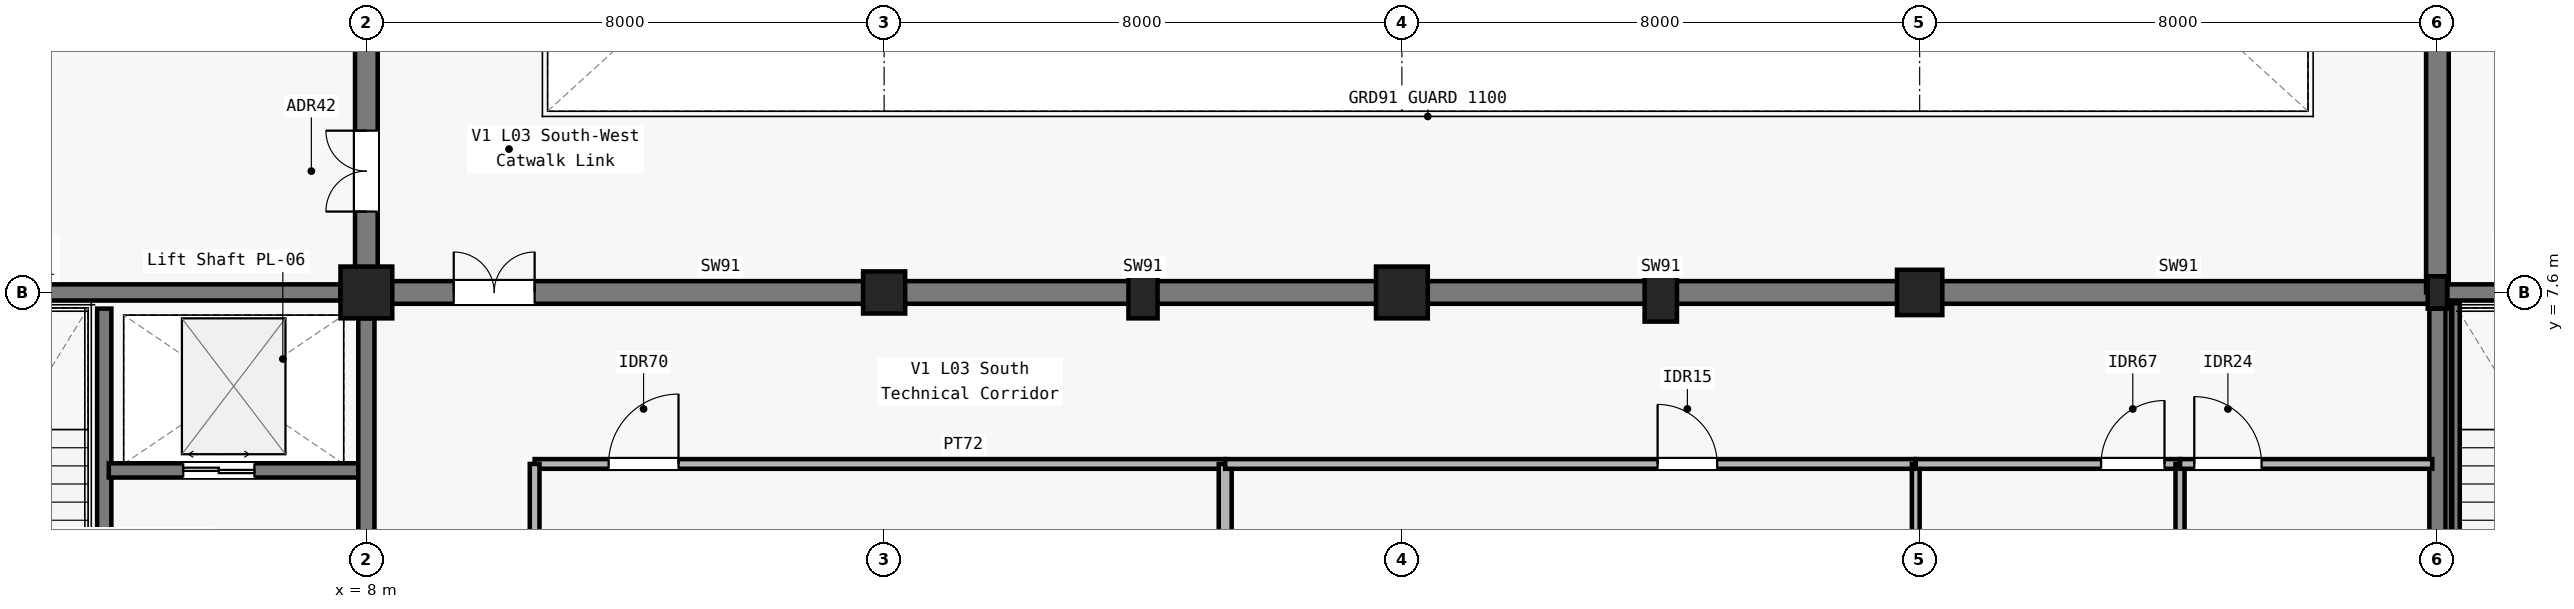
"""IFC4 building model, lengths in metres.
Left out: names, types, materials, properties, quantities, classifications, styles, units other than length and angle.
Written with IfcOpenShell. Run it as: python <this file> out.ifc"""

import sys

from ifc_helpers import new_model, si_unit, direction, frame, frame_2d, origin, origin_2d, place, context, subcontext, project, spatial, rectangle, circle, i_section, extrude, element, fill, save


model = new_model("IFC4")
c1 = context("Model", 3, precision=1e-05, world=origin(), true_north=direction((0.0, 1.0)))
c2 = subcontext(c1, "Body", "Model", "MODEL_VIEW")
j1 = project(units=[si_unit("LENGTHUNIT", "METRE"), si_unit("PLANEANGLEUNIT", "RADIAN")], contexts=[c1])
p1 = place(None, origin())
s1 = spatial("IfcSite", under=j1, at=p1, CompositionType="ELEMENT")
p2 = place(p1, origin())
s2 = spatial("IfcBuilding", under=s1, at=p2, CompositionType="ELEMENT")
p3 = place(p2, frame((0.0, 0.0, 15.0)))
s3 = spatial("IfcBuildingStorey", under=s2, at=p3, CompositionType="ELEMENT", Elevation=15.0)
p4 = place(p3, frame((8.0, 7.6, 0.0), z_axis=(0.0, 0.0, 1.0), x_axis=(1.0, 0.0, 0.0)))
e1 = element("IfcColumn", 1, at=p4, inside=s3, PredefinedType="COLUMN", context=c2, shape_type="SweptSolid", body=[
    extrude(circle(Radius=0.4, at=origin_2d()), origin(), (0.0, 0.0, 1.0), 4.8),
])
p5 = place(p3, frame((16.0, 7.6, 0.0), z_axis=(0.0, 0.0, 1.0), x_axis=(1.0, 0.0, 0.0)))
e2 = element("IfcColumn", 2, at=p5, inside=s3, PredefinedType="COLUMN", context=c2, shape_type="SweptSolid", body=[
    extrude(circle(Radius=0.325, at=origin_2d()), origin(), (0.0, 0.0, 1.0), 4.8),
])
p6 = place(p3, frame((24.0, 7.6, 0.0), z_axis=(0.0, 0.0, 1.0), x_axis=(1.0, 0.0, 0.0)))
e3 = element("IfcColumn", 3, at=p6, inside=s3, PredefinedType="COLUMN", context=c2, shape_type="SweptSolid", body=[
    extrude(rectangle(XDim=0.8, YDim=0.8, at=origin_2d()), origin(), (0.0, 0.0, 1.0), 4.8),
])
p7 = place(p3, frame((32.0, 7.6, 0.0), z_axis=(0.0, 0.0, 1.0), x_axis=(1.0, 0.0, 0.0)))
e4 = element("IfcColumn", 4, at=p7, inside=s3, PredefinedType="COLUMN", context=c2, shape_type="SweptSolid", body=[
    extrude(rectangle(XDim=0.7, YDim=0.7, at=origin_2d()), origin(), (0.0, 0.0, 1.0), 4.8),
])
p8 = place(p3, frame((40.0, 7.6, 0.0), z_axis=(0.0, 0.0, 1.0), x_axis=(1.0, 0.0, 0.0)))
e5 = element("IfcColumn", 5, at=p8, inside=s3, PredefinedType="COLUMN", context=c2, shape_type="SweptSolid", body=[
    extrude(i_section(OverallWidth=0.3, OverallDepth=0.5, WebThickness=0.014, FlangeThickness=0.028, FilletRadius=0.027, at=origin_2d()), origin(), (0.0, 0.0, 1.0), 4.8),
])
p9 = place(p3, frame((20.0, 7.6, 0.0), z_axis=(0.0, 0.0, 1.0), x_axis=(1.0, 0.0, 0.0)))
e6 = element("IfcColumn", 6, at=p9, inside=s3, PredefinedType="PILASTER", context=c2, shape_type="SweptSolid", body=[
    extrude(rectangle(XDim=0.45, YDim=0.8, at=origin_2d()), origin(), (0.0, 0.0, 1.0), 4.8),
])
p10 = place(p3, frame((28.0, 7.6, 0.0), z_axis=(0.0, 0.0, 1.0), x_axis=(1.0, 0.0, 0.0)))
e7 = element("IfcColumn", 7, at=p10, inside=s3, PredefinedType="PILASTER", context=c2, shape_type="SweptSolid", body=[
    extrude(rectangle(XDim=0.5, YDim=0.9, at=origin_2d()), origin(), (0.0, 0.0, 1.0), 4.8),
])
p11 = place(p3, frame((8.0, 7.6, 0.0), z_axis=(0.0, 0.0, 1.0), x_axis=(1.0, 0.0, 0.0)))
e8 = element("IfcWall", 8, at=p11, inside=s3, PredefinedType="SHEAR", context=c2, shape_type="SweptSolid", body=[
    extrude(rectangle(XDim=8.0, YDim=0.35, at=frame_2d((4.0, 0.0))), origin(), (0.0, 0.0, 1.0), 4.53),
])
p12 = place(p11, frame((1.35, 0.0, 0.0)))
e9 = element("IfcOpeningElement", 9, at=p12, cuts=e8, PredefinedType="OPENING", context=c2, shape_type="SweptSolid", body=[
    extrude(rectangle(XDim=1.25, YDim=2.2, at=frame_2d((0.625, 1.1))), frame((0.0, 0.185, 0.0), z_axis=(0.0, -1.0, 0.0), x_axis=(1.0, 0.0, 0.0)), (0.0, 0.0, 1.0), 0.37),
])
for number, where, z_axis, x_axis in (
    (10, (16.0, 7.6, 0.0), (0.0, 0.0, 1.0), (1.0, 0.0, 0.0)),
    (11, (24.0, 7.6, 0.0), (0.0, 0.0, 1.0), (1.0, 0.0, 0.0)),
    (12, (32.0, 7.6, 0.0), (0.0, 0.0, 1.0), (1.0, 0.0, 0.0)),
):
    element("IfcWall", number, at=place(p3, frame(where, z_axis=z_axis, x_axis=x_axis)), inside=s3, PredefinedType="SHEAR", context=c2, shape_type="SweptSolid", body=[
        extrude(rectangle(XDim=8.0, YDim=0.35, at=frame_2d((4.0, 0.0))), origin(), (0.0, 0.0, 1.0), 4.53),
    ])
p13 = place(p3, frame((8.0, 7.6, 0.0), z_axis=(0.0, 0.0, 1.0), x_axis=(0.0, 1.0, 0.0)))
e13 = element("IfcWall", 13, at=p13, inside=s3, PredefinedType="SHEAR", context=c2, shape_type="SweptSolid", body=[
    extrude(rectangle(XDim=7.6, YDim=0.35, at=frame_2d((3.8, 0.0))), origin(), (0.0, 0.0, 1.0), 4.53),
])
p14 = place(p13, frame((1.25, 0.0, 0.0)))
e14 = element("IfcOpeningElement", 14, at=p14, cuts=e13, PredefinedType="OPENING", context=c2, shape_type="SweptSolid", body=[
    extrude(rectangle(XDim=1.25, YDim=2.2, at=frame_2d((0.625, 1.1))), frame((0.0, 0.185, 0.0), z_axis=(0.0, -1.0, 0.0), x_axis=(1.0, 0.0, 0.0)), (0.0, 0.0, 1.0), 0.37),
])
p15 = place(p3, frame((40.0, 7.6, 0.0), z_axis=(0.0, 0.0, 1.0), x_axis=(0.0, 1.0, 0.0)))
e15 = element("IfcWall", 15, at=p15, inside=s3, PredefinedType="SHEAR", context=c2, shape_type="SweptSolid", body=[
    extrude(rectangle(XDim=7.6, YDim=0.35, at=frame_2d((3.8, 0.0))), origin(), (0.0, 0.0, 1.0), 4.53),
])
p16 = place(p3, frame((0.25, 7.6, 0.0), z_axis=(0.0, 0.0, 1.0), x_axis=(1.0, 0.0, 0.0)))
e16 = element("IfcWall", 16, at=p16, inside=s3, PredefinedType="SOLIDWALL", context=c2, shape_type="SweptSolid", body=[
    extrude(rectangle(XDim=7.35, YDim=0.25, at=frame_2d((3.675, 0.0))), origin(), (0.0, 0.0, 1.0), 3.755),
])
p17 = place(p3, frame((3.95, 0.25, 0.0), z_axis=(0.0, 0.0, 1.0), x_axis=(0.0, 1.0, 0.0)))
e17 = element("IfcWall", 17, at=p17, inside=s3, PredefinedType="SOLIDWALL", context=c2, shape_type="SweptSolid", body=[
    extrude(rectangle(XDim=7.1, YDim=0.22, at=frame_2d((3.55, 0.0))), origin(), (0.0, 0.0, 1.0), 4.53),
])
p18 = place(p17, frame((0.35, 0.0, 0.0)))
e18 = element("IfcOpeningElement", 18, at=p18, cuts=e17, PredefinedType="OPENING", context=c2, shape_type="SweptSolid", body=[
    extrude(rectangle(XDim=1.2, YDim=2.15, at=frame_2d((0.6, 1.075))), frame((0.0, 0.12, 0.0), z_axis=(0.0, -1.0, 0.0), x_axis=(1.0, 0.0, 0.0)), (0.0, 0.0, 1.0), 0.24),
])
p19 = place(p3, frame((4.02, 4.85, 0.0), z_axis=(0.0, 0.0, 1.0), x_axis=(1.0, 0.0, 0.0)))
e19 = element("IfcWall", 19, at=p19, inside=s3, PredefinedType="SOLIDWALL", context=c2, shape_type="SweptSolid", body=[
    extrude(rectangle(XDim=3.93, YDim=0.22, at=frame_2d((1.965, 0.0))), origin(), (0.0, 0.0, 1.0), 3.905),
])
p20 = place(p19, frame((1.15, 0.0, 0.0)))
e20 = element("IfcOpeningElement", 20, at=p20, cuts=e19, PredefinedType="OPENING", context=c2, shape_type="SweptSolid", body=[
    extrude(rectangle(XDim=1.1, YDim=2.2, at=frame_2d((0.55, 1.1))), frame((0.0, 0.12, 0.0), z_axis=(0.0, -1.0, 0.0), x_axis=(1.0, 0.0, 0.0)), (0.0, 0.0, 1.0), 0.24),
])
p21 = place(p3, frame((8.0, 0.25, 0.0), z_axis=(0.0, 0.0, 1.0), x_axis=(0.0, 1.0, 0.0)))
e21 = element("IfcWall", 21, at=p21, inside=s3, PredefinedType="SOLIDWALL", context=c2, shape_type="SweptSolid", body=[
    extrude(rectangle(XDim=6.95, YDim=0.25, at=frame_2d((3.475, 0.0))), origin(), (0.0, 0.0, 1.0), 3.705),
])
p22 = place(p21, frame((2.1, 0.0, 0.0)))
e22 = element("IfcOpeningElement", 22, at=p22, cuts=e21, PredefinedType="OPENING", context=c2, shape_type="SweptSolid", body=[
    extrude(rectangle(XDim=1.35, YDim=2.2, at=frame_2d((0.675, 1.1))), frame((0.0, 0.135, 0.0), z_axis=(0.0, -1.0, 0.0), x_axis=(1.0, 0.0, 0.0)), (0.0, 0.0, 1.0), 0.27),
])
p23 = place(p3, frame((40.0, 0.25, 0.0), z_axis=(0.0, 0.0, 1.0), x_axis=(0.0, 1.0, 0.0)))
e23 = element("IfcWall", 23, at=p23, inside=s3, PredefinedType="SOLIDWALL", context=c2, shape_type="SweptSolid", body=[
    extrude(rectangle(XDim=7.1, YDim=0.25, at=frame_2d((3.55, 0.0))), origin(), (0.0, 0.0, 1.0), 3.42),
])
p24 = place(p3, frame((40.15, 7.6, 0.0), z_axis=(0.0, 0.0, 1.0), x_axis=(1.0, 0.0, 0.0)))
e24 = element("IfcWall", 24, at=p24, inside=s3, PredefinedType="SOLIDWALL", context=c2, shape_type="SweptSolid", body=[
    extrude(rectangle(XDim=7.77, YDim=0.25, at=frame_2d((3.885, 0.0))), origin(), (0.0, 0.0, 1.0), 3.42),
])
p25 = place(p3, frame((10.6, 4.95, 0.0), z_axis=(0.0, 0.0, 1.0), x_axis=(1.0, 0.0, 0.0)))
e25 = element("IfcWall", 25, at=p25, inside=s3, PredefinedType="PARTITIONING", context=c2, shape_type="SweptSolid", body=[
    extrude(rectangle(XDim=10.67, YDim=0.15, at=frame_2d((5.335, 0.0))), origin(), (0.0, 0.0, 1.0), 3.885),
])
p26 = place(p25, frame((1.143, 0.0, 0.0)))
e26 = element("IfcOpeningElement", 26, at=p26, cuts=e25, PredefinedType="OPENING", context=c2, shape_type="SweptSolid", body=[
    extrude(rectangle(XDim=1.08, YDim=2.1, at=frame_2d((0.54, 1.05))), frame((0.0, 0.085, 0.0), z_axis=(0.0, -1.0, 0.0), x_axis=(1.0, 0.0, 0.0)), (0.0, 0.0, 1.0), 0.17),
])
p27 = place(p3, frame((21.27, 0.08, 0.0), z_axis=(0.0, 0.0, 1.0), x_axis=(0.0, 1.0, 0.0)))
e27 = element("IfcWall", 27, at=p27, inside=s3, PredefinedType="PARTITIONING", context=c2, shape_type="SweptSolid", body=[
    extrude(rectangle(XDim=4.87, YDim=0.2, at=frame_2d((2.435, 0.0))), origin(), (0.0, 0.0, 1.0), 3.78),
])
p28 = place(p3, frame((21.27, 4.95, 0.0), z_axis=(0.0, 0.0, 1.0), x_axis=(1.0, 0.0, 0.0)))
e28 = element("IfcWall", 28, at=p28, inside=s3, PredefinedType="PARTITIONING", context=c2, shape_type="SweptSolid", body=[
    extrude(rectangle(XDim=10.67, YDim=0.15, at=frame_2d((5.335, 0.0))), origin(), (0.0, 0.0, 1.0), 3.755),
])
p29 = place(p28, frame((6.681, 0.0, 0.0)))
e29 = element("IfcOpeningElement", 29, at=p29, cuts=e28, PredefinedType="OPENING", context=c2, shape_type="SweptSolid", body=[
    extrude(rectangle(XDim=0.92, YDim=2.15, at=frame_2d((0.46, 1.075))), frame((0.0, 0.085, 0.0), z_axis=(0.0, -1.0, 0.0), x_axis=(1.0, 0.0, 0.0)), (0.0, 0.0, 1.0), 0.17),
])
p30 = place(p3, frame((31.94, 0.4, 0.0), z_axis=(0.0, 0.0, 1.0), x_axis=(0.0, 1.0, 0.0)))
e30 = element("IfcWall", 30, at=p30, inside=s3, PredefinedType="PARTITIONING", context=c2, shape_type="SweptSolid", body=[
    extrude(rectangle(XDim=4.55, YDim=0.12, at=frame_2d((2.275, 0.0))), origin(), (0.0, 0.0, 1.0), 3.755),
])
p31 = place(p3, frame((31.94, 4.95, 0.0), z_axis=(0.0, 0.0, 1.0), x_axis=(1.0, 0.0, 0.0)))
e31 = element("IfcWall", 31, at=p31, inside=s3, PredefinedType="PARTITIONING", context=c2, shape_type="SweptSolid", body=[
    extrude(rectangle(XDim=4.083, YDim=0.15, at=frame_2d((2.042, 0.0))), origin(), (0.0, 0.0, 1.0), 3.755),
])
p32 = place(p31, frame((2.863, 0.0, 0.0)))
e32 = element("IfcOpeningElement", 32, at=p32, cuts=e31, PredefinedType="OPENING", context=c2, shape_type="SweptSolid", body=[
    extrude(rectangle(XDim=0.98, YDim=2.15, at=frame_2d((0.49, 1.075))), frame((0.0, 0.085, 0.0), z_axis=(0.0, -1.0, 0.0), x_axis=(1.0, 0.0, 0.0)), (0.0, 0.0, 1.0), 0.17),
])
p33 = place(p3, frame((36.023, 0.08, 0.0), z_axis=(0.0, 0.0, 1.0), x_axis=(0.0, 1.0, 0.0)))
e33 = element("IfcWall", 33, at=p33, inside=s3, PredefinedType="PARTITIONING", context=c2, shape_type="SweptSolid", body=[
    extrude(rectangle(XDim=4.87, YDim=0.14, at=frame_2d((2.435, 0.0))), origin(), (0.0, 0.0, 1.0), 3.925),
])
p34 = place(p3, frame((36.023, 4.95, 0.0), z_axis=(0.0, 0.0, 1.0), x_axis=(1.0, 0.0, 0.0)))
e34 = element("IfcWall", 34, at=p34, inside=s3, PredefinedType="PARTITIONING", context=c2, shape_type="SweptSolid", body=[
    extrude(rectangle(XDim=3.897, YDim=0.15, at=frame_2d((1.948, 0.0))), origin(), (0.0, 0.0, 1.0), 3.705),
])
p35 = place(p34, frame((0.22, 0.0, 0.0)))
e35 = element("IfcOpeningElement", 35, at=p35, cuts=e34, PredefinedType="OPENING", context=c2, shape_type="SweptSolid", body=[
    extrude(rectangle(XDim=1.04, YDim=2.15, at=frame_2d((0.52, 1.075))), frame((0.0, 0.085, 0.0), z_axis=(0.0, -1.0, 0.0), x_axis=(1.0, 0.0, 0.0)), (0.0, 0.0, 1.0), 0.17),
])
p36 = place(p3, frame((10.6, 0.08, 0.0), z_axis=(0.0, 0.0, 1.0), x_axis=(0.0, 1.0, 0.0)))
e36 = element("IfcWall", 36, at=p36, inside=s3, PredefinedType="PARTITIONING", context=c2, shape_type="SweptSolid", body=[
    extrude(rectangle(XDim=4.87, YDim=0.15, at=frame_2d((2.435, 0.0))), origin(), (0.0, 0.0, 1.0), 3.9),
])
p37 = place(p3, frame((40.275, 0.15, 0.0), z_axis=(0.0, 0.0, 1.0), x_axis=(0.0, 1.0, 0.0)))
e37 = element("IfcWall", 37, at=p37, inside=s3, PredefinedType="SOLIDWALL", context=c2, shape_type="SweptSolid", body=[
    extrude(rectangle(XDim=7.3, YDim=0.14, at=frame_2d((3.65, 0.0))), origin(), (0.0, 0.0, 1.0), 4.53),
])
p38 = place(p20, origin())
e38 = element("IfcDoor", 38, at=p38, inside=s3, OperationType="DOUBLE_DOOR_SLIDING", PredefinedType="DOOR", context=c2, shape_type="SweptSolid", body=[
    extrude(rectangle(XDim=1.1, YDim=2.2, at=frame_2d((0.55, 1.1))), frame((0.0, 0.025, 0.0), z_axis=(0.0, -1.0, 0.0), x_axis=(1.0, 0.0, 0.0)), (0.0, 0.0, 1.0), 0.05),
])
fill(e20, e38)
p39 = place(p26, origin())
e39 = element("IfcDoor", 39, at=p39, inside=s3, OperationType="SINGLE_SWING_RIGHT", PredefinedType="DOOR", context=c2, shape_type="SweptSolid", body=[
    extrude(rectangle(XDim=1.08, YDim=2.1, at=frame_2d((0.54, 1.05))), frame((0.0, 0.025, 0.0), z_axis=(0.0, -1.0, 0.0), x_axis=(1.0, 0.0, 0.0)), (0.0, 0.0, 1.0), 0.05),
])
fill(e26, e39)
p40 = place(p29, origin())
e40 = element("IfcDoor", 40, at=p40, inside=s3, OperationType="SINGLE_SWING_LEFT", PredefinedType="DOOR", context=c2, shape_type="SweptSolid", body=[
    extrude(rectangle(XDim=0.92, YDim=2.15, at=frame_2d((0.46, 1.075))), frame((0.0, 0.025, 0.0), z_axis=(0.0, -1.0, 0.0), x_axis=(1.0, 0.0, 0.0)), (0.0, 0.0, 1.0), 0.05),
])
fill(e29, e40)
p41 = place(p32, origin())
e41 = element("IfcDoor", 41, at=p41, inside=s3, OperationType="SINGLE_SWING_RIGHT", PredefinedType="DOOR", context=c2, shape_type="SweptSolid", body=[
    extrude(rectangle(XDim=0.98, YDim=2.15, at=frame_2d((0.49, 1.075))), frame((0.0, 0.025, 0.0), z_axis=(0.0, -1.0, 0.0), x_axis=(1.0, 0.0, 0.0)), (0.0, 0.0, 1.0), 0.05),
])
fill(e32, e41)
p42 = place(p35, origin())
e42 = element("IfcDoor", 42, at=p42, inside=s3, OperationType="SINGLE_SWING_LEFT", PredefinedType="DOOR", context=c2, shape_type="SweptSolid", body=[
    extrude(rectangle(XDim=1.04, YDim=2.15, at=frame_2d((0.52, 1.075))), frame((0.0, 0.025, 0.0), z_axis=(0.0, -1.0, 0.0), x_axis=(1.0, 0.0, 0.0)), (0.0, 0.0, 1.0), 0.05),
])
fill(e35, e42)
p43 = place(p14, origin())
e43 = element("IfcDoor", 43, at=p43, inside=s3, OperationType="DOUBLE_DOOR_SINGLE_SWING", PredefinedType="DOOR", context=c2, shape_type="SweptSolid", body=[
    extrude(rectangle(XDim=1.25, YDim=2.2, at=frame_2d((0.625, 1.1))), frame((0.0, 0.025, 0.0), z_axis=(0.0, -1.0, 0.0), x_axis=(1.0, 0.0, 0.0)), (0.0, 0.0, 1.0), 0.05),
])
fill(e14, e43)
p44 = place(p12, origin())
e44 = element("IfcDoor", 44, at=p44, inside=s3, OperationType="DOUBLE_DOOR_SINGLE_SWING", PredefinedType="DOOR", context=c2, shape_type="SweptSolid", body=[
    extrude(rectangle(XDim=1.25, YDim=2.2, at=frame_2d((0.625, 1.1))), frame((0.0, 0.025, 0.0), z_axis=(0.0, -1.0, 0.0), x_axis=(1.0, 0.0, 0.0)), (0.0, 0.0, 1.0), 0.05),
])
fill(e9, e44)
save(model, sys.argv[1])
